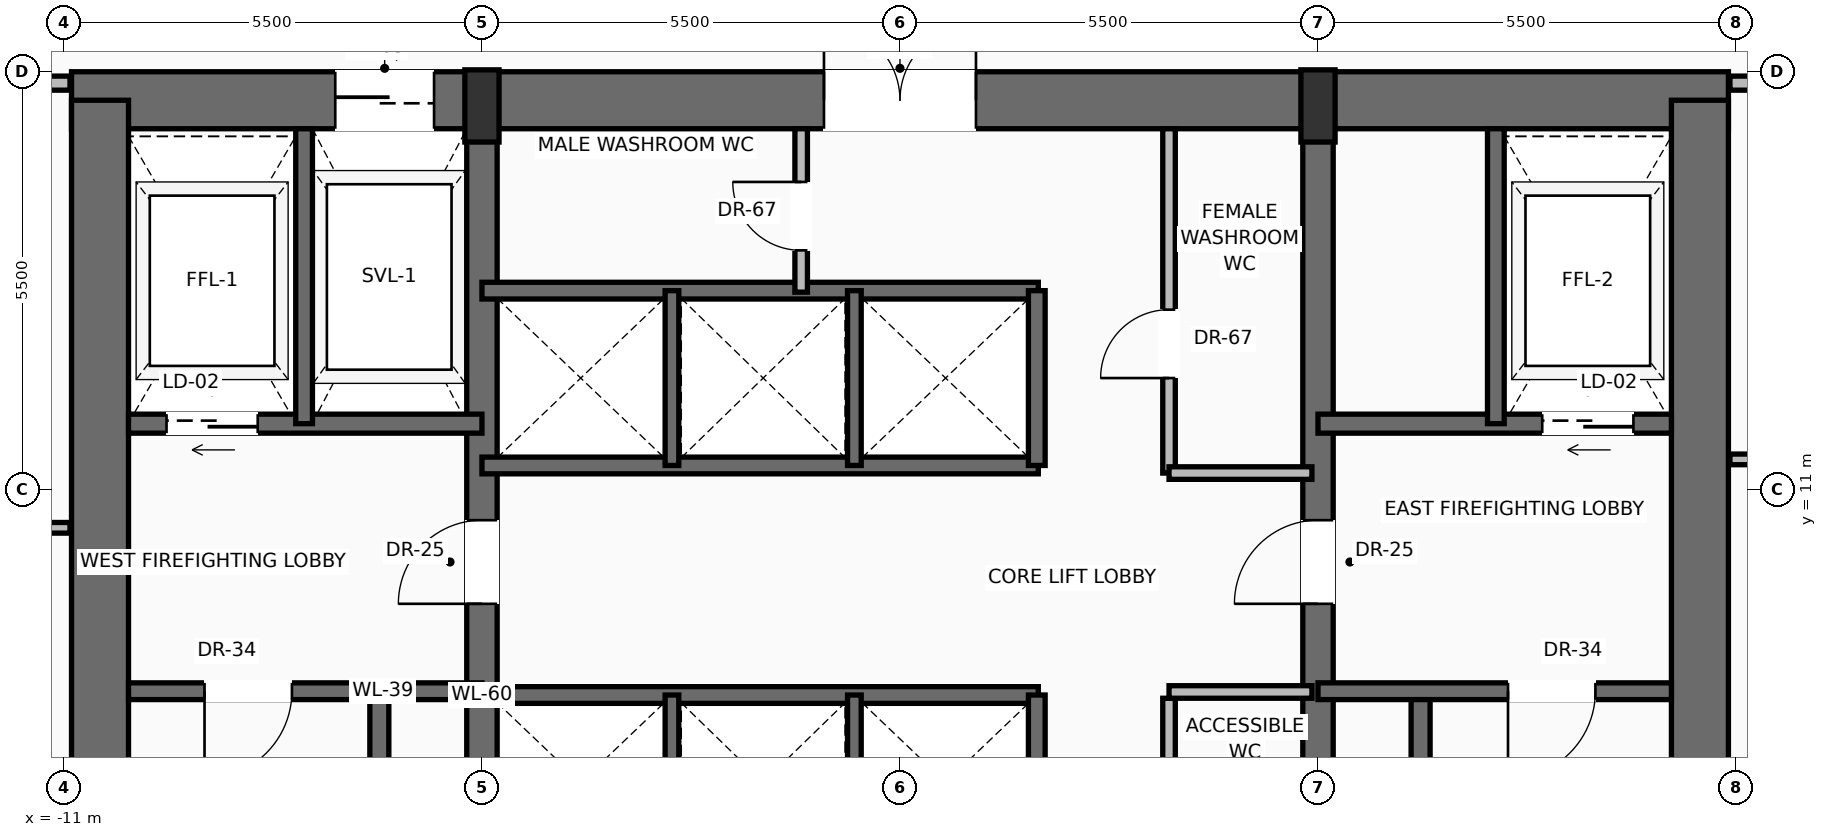
"""IFC4 building model, lengths in metres.
Left out: names, types, materials, properties, quantities, classifications, styles, units other than length and angle.
Written with IfcOpenShell. Run it as: python <this file> out.ifc"""

import sys

from ifc_helpers import new_model, si_unit, direction, frame, frame_2d, origin, origin_2d, place, context, subcontext, project, spatial, rectangle, extrude, source, transform, mapped, element, fill, save


model = new_model("IFC4")
c1 = context("Model", 3, precision=1e-05, world=origin(), true_north=direction((0.0, 1.0)))
c2 = subcontext(c1, "Body", "Model", "MODEL_VIEW")
j1 = project(units=[si_unit("LENGTHUNIT", "METRE"), si_unit("PLANEANGLEUNIT", "RADIAN")], contexts=[c1])
p1 = place(None, origin())
s1 = spatial("IfcSite", under=j1, at=p1, CompositionType="ELEMENT")
p2 = place(p1, origin())
s2 = spatial("IfcBuilding", under=s1, at=p2, CompositionType="ELEMENT")
p3 = place(p2, frame((0.0, 0.0, 95.1)))
s3 = spatial("IfcBuildingStorey", under=s2, at=p3, CompositionType="ELEMENT", Elevation=95.1)
p4 = place(p3, frame((-10.9, 16.125, 0.0), z_axis=(0.0, 0.0, 1.0), x_axis=(1.0, 0.0, 0.0)))
e1 = element("IfcWall", 1, at=p4, inside=s3, PredefinedType="SHEAR", context=c2, shape_type="SweptSolid", body=[
    extrude(rectangle(XDim=21.8, YDim=0.75, at=frame_2d((10.9, 0.0))), origin(), (0.0, 0.0, 1.0), 3.45),
])
p5 = place(p4, frame((3.47, 0.0, 0.0)))
e2 = element("IfcOpeningElement", 2, at=p5, cuts=e1, PredefinedType="OPENING", context=c2, shape_type="SweptSolid", body=[
    extrude(rectangle(XDim=1.3, YDim=2.3, at=frame_2d((0.65, 1.15))), frame((0.0, 0.385, 0.0), z_axis=(0.0, -1.0, 0.0), x_axis=(1.0, 0.0, 0.0)), (0.0, 0.0, 1.0), 0.77),
])
p6 = place(p4, frame((9.9, 0.0, 0.0)))
e3 = element("IfcOpeningElement", 3, at=p6, cuts=e1, PredefinedType="OPENING", context=c2, shape_type="SweptSolid", body=[
    extrude(rectangle(XDim=2.0, YDim=2.4, at=frame_2d((1.0, 1.2))), frame((0.0, 0.385, 0.0), z_axis=(0.0, -1.0, 0.0), x_axis=(1.0, 0.0, 0.0)), (0.0, 0.0, 1.0), 0.77),
])
for number, where, z_axis, x_axis in (
    (4, (-10.525, 0.475, 0.0), (0.0, 0.0, 1.0), (0.0, 1.0, 0.0)),
    (5, (10.525, 0.475, 0.0), (0.0, 0.0, 1.0), (0.0, 1.0, 0.0)),
):
    element("IfcWall", number, at=place(p3, frame(where, z_axis=z_axis, x_axis=x_axis)), inside=s3, PredefinedType="SHEAR", context=c2, shape_type="SweptSolid", body=[
        extrude(rectangle(XDim=15.65, YDim=0.75, at=frame_2d((7.825, 0.0))), origin(), (0.0, 0.0, 1.0), 3.45),
    ])
p7 = place(p3, frame((-5.5, 0.475, 0.0), z_axis=(0.0, 0.0, 1.0), x_axis=(0.0, 1.0, 0.0)))
e6 = element("IfcWall", 6, at=p7, inside=s3, PredefinedType="SHEAR", context=c2, shape_type="SweptSolid", body=[
    extrude(rectangle(XDim=15.65, YDim=0.4, at=frame_2d((7.825, 0.0))), origin(), (0.0, 0.0, 1.0), 3.45),
])
p8 = place(p7, frame((9.025, 0.0, 0.0)))
e7 = element("IfcOpeningElement", 7, at=p8, cuts=e6, PredefinedType="OPENING", context=c2, shape_type="SweptSolid", body=[
    extrude(rectangle(XDim=1.1, YDim=2.2, at=frame_2d((0.55, 1.1))), frame((0.0, 0.21, 0.0), z_axis=(0.0, -1.0, 0.0), x_axis=(1.0, 0.0, 0.0)), (0.0, 0.0, 1.0), 0.42),
])
p9 = place(p3, frame((5.5, 0.475, 0.0), z_axis=(0.0, 0.0, 1.0), x_axis=(0.0, 1.0, 0.0)))
e8 = element("IfcWall", 8, at=p9, inside=s3, PredefinedType="SHEAR", context=c2, shape_type="SweptSolid", body=[
    extrude(rectangle(XDim=15.65, YDim=0.4, at=frame_2d((7.825, 0.0))), origin(), (0.0, 0.0, 1.0), 3.45),
])
p10 = place(p9, frame((9.025, 0.0, 0.0)))
e9 = element("IfcOpeningElement", 9, at=p10, cuts=e8, PredefinedType="OPENING", context=c2, shape_type="SweptSolid", body=[
    extrude(rectangle(XDim=1.1, YDim=2.2, at=frame_2d((0.55, 1.1))), frame((0.0, 0.21, 0.0), z_axis=(0.0, -1.0, 0.0), x_axis=(1.0, 0.0, 0.0)), (0.0, 0.0, 1.0), 0.42),
])
m1 = source(origin(), c2, "Body", "SweptSolid", [
    extrude(rectangle(XDim=0.45, YDim=0.95, at=origin_2d()), origin(), (0.0, 0.0, 1.0), 3.7),
])
for number, where, z_axis, x_axis in (
    (10, (-5.5, 16.05, 0.0), (0.0, 0.0, 1.0), (1.0, 0.0, 0.0)),
    (11, (5.5, 16.05, 0.0), (0.0, 0.0, 1.0), (1.0, 0.0, 0.0)),
):
    element("IfcColumn", number, at=place(p3, frame(where, z_axis=z_axis, x_axis=x_axis)), inside=s3, PredefinedType="PILASTER", context=c2, shape_type="MappedRepresentation", body=[
        mapped(m1, transform((0.0, 0.0, 0.0), scale=1.0)),
    ])
p11 = place(p3, frame((-6.85, 0.85, 0.0), z_axis=(0.0, 0.0, 1.0), x_axis=(0.0, 1.0, 0.0)))
e12 = element("IfcWall", 12, at=p11, inside=s3, PredefinedType="SOLIDWALL", context=c2, shape_type="SweptSolid", body=[
    extrude(rectangle(XDim=7.5, YDim=0.25, at=frame_2d((3.75, 0.0))), origin(), (0.0, 0.0, 1.0), 3.45),
])
p12 = place(p3, frame((-5.5, 8.35, 0.0), z_axis=(0.0, 0.0, 1.0), x_axis=(-1.0, 0.0, 0.0)))
e13 = element("IfcWall", 13, at=p12, inside=s3, PredefinedType="SOLIDWALL", context=c2, shape_type="SweptSolid", body=[
    extrude(rectangle(XDim=4.65, YDim=0.22, at=frame_2d((2.325, 0.0))), origin(), (0.0, 0.0, 1.0), 3.45),
])
p13 = place(p12, frame((2.5, 0.0, 0.0)))
e14 = element("IfcOpeningElement", 14, at=p13, cuts=e13, PredefinedType="OPENING", context=c2, shape_type="SweptSolid", body=[
    extrude(rectangle(XDim=1.15, YDim=2.2, at=frame_2d((0.575, 1.1))), frame((0.0, 0.12, 0.0), z_axis=(0.0, -1.0, 0.0), x_axis=(1.0, 0.0, 0.0)), (0.0, 0.0, 1.0), 0.24),
])
p14 = place(p3, frame((-5.5, 11.87, 0.0), z_axis=(0.0, 0.0, 1.0), x_axis=(-1.0, 0.0, 0.0)))
e15 = element("IfcWall", 15, at=p14, inside=s3, PredefinedType="SOLIDWALL", context=c2, shape_type="SweptSolid", body=[
    extrude(rectangle(XDim=4.65, YDim=0.25, at=frame_2d((2.325, 0.0))), origin(), (0.0, 0.0, 1.0), 3.45),
])
p15 = place(p14, frame((2.95, 0.0, 0.0)))
e16 = element("IfcOpeningElement", 16, at=p15, cuts=e15, PredefinedType="OPENING", context=c2, shape_type="SweptSolid", body=[
    extrude(rectangle(XDim=1.2, YDim=2.25, at=frame_2d((0.6, 1.125))), frame((0.0, 0.135, 0.0), z_axis=(0.0, -1.0, 0.0), x_axis=(1.0, 0.0, 0.0)), (0.0, 0.0, 1.0), 0.27),
])
p16 = place(p3, frame((-7.84, 11.87, 0.0), z_axis=(0.0, 0.0, 1.0), x_axis=(0.0, 1.0, 0.0)))
e17 = element("IfcWall", 17, at=p16, inside=s3, PredefinedType="SOLIDWALL", context=c2, shape_type="SweptSolid", body=[
    extrude(rectangle(XDim=3.88, YDim=0.22, at=frame_2d((1.94, 0.0))), origin(), (0.0, 0.0, 1.0), 3.45),
])
p17 = place(p3, frame((6.85, 0.85, 0.0), z_axis=(0.0, 0.0, 1.0), x_axis=(0.0, 1.0, 0.0)))
e18 = element("IfcWall", 18, at=p17, inside=s3, PredefinedType="SOLIDWALL", context=c2, shape_type="SweptSolid", body=[
    extrude(rectangle(XDim=7.5, YDim=0.25, at=frame_2d((3.75, 0.0))), origin(), (0.0, 0.0, 1.0), 3.45),
])
p18 = place(p3, frame((10.15, 8.35, 0.0), z_axis=(0.0, 0.0, 1.0), x_axis=(-1.0, 0.0, 0.0)))
e19 = element("IfcWall", 19, at=p18, inside=s3, PredefinedType="SOLIDWALL", context=c2, shape_type="SweptSolid", body=[
    extrude(rectangle(XDim=4.65, YDim=0.22, at=frame_2d((2.325, 0.0))), origin(), (0.0, 0.0, 1.0), 3.45),
])
p19 = place(p18, frame((1.0, 0.0, 0.0)))
e20 = element("IfcOpeningElement", 20, at=p19, cuts=e19, PredefinedType="OPENING", context=c2, shape_type="SweptSolid", body=[
    extrude(rectangle(XDim=1.15, YDim=2.2, at=frame_2d((0.575, 1.1))), frame((0.0, 0.12, 0.0), z_axis=(0.0, -1.0, 0.0), x_axis=(1.0, 0.0, 0.0)), (0.0, 0.0, 1.0), 0.24),
])
p20 = place(p3, frame((10.15, 11.87, 0.0), z_axis=(0.0, 0.0, 1.0), x_axis=(-1.0, 0.0, 0.0)))
e21 = element("IfcWall", 21, at=p20, inside=s3, PredefinedType="SOLIDWALL", context=c2, shape_type="SweptSolid", body=[
    extrude(rectangle(XDim=4.65, YDim=0.25, at=frame_2d((2.325, 0.0))), origin(), (0.0, 0.0, 1.0), 3.45),
])
p21 = place(p20, frame((0.5, 0.0, 0.0)))
e22 = element("IfcOpeningElement", 22, at=p21, cuts=e21, PredefinedType="OPENING", context=c2, shape_type="SweptSolid", body=[
    extrude(rectangle(XDim=1.2, YDim=2.25, at=frame_2d((0.6, 1.125))), frame((0.0, 0.135, 0.0), z_axis=(0.0, -1.0, 0.0), x_axis=(1.0, 0.0, 0.0)), (0.0, 0.0, 1.0), 0.27),
])
p22 = place(p3, frame((7.84, 11.87, 0.0), z_axis=(0.0, 0.0, 1.0), x_axis=(0.0, 1.0, 0.0)))
e23 = element("IfcWall", 23, at=p22, inside=s3, PredefinedType="SOLIDWALL", context=c2, shape_type="SweptSolid", body=[
    extrude(rectangle(XDim=3.88, YDim=0.22, at=frame_2d((1.94, 0.0))), origin(), (0.0, 0.0, 1.0), 3.45),
])
p23 = place(p3, frame((3.54, 4.433, 0.0), z_axis=(0.0, 0.0, 1.0), x_axis=(0.0, 1.0, 0.0)))
e24 = element("IfcWall", 24, at=p23, inside=s3, PredefinedType="PARTITIONING", context=c2, shape_type="SweptSolid", body=[
    extrude(rectangle(XDim=3.825, YDim=0.165, at=frame_2d((1.913, 0.0))), origin(), (0.0, 0.0, 1.0), 3.442),
])
p24 = place(p23, frame((1.721, 0.0, 0.0)))
e25 = element("IfcOpeningElement", 25, at=p24, cuts=e24, PredefinedType="OPENING", context=c2, shape_type="SweptSolid", body=[
    extrude(rectangle(XDim=0.9, YDim=2.1, at=frame_2d((0.45, 1.05))), frame((0.0, 0.093, 0.0), z_axis=(0.0, -1.0, 0.0), x_axis=(1.0, 0.0, 0.0)), (0.0, 0.0, 1.0), 0.185),
])
p25 = place(p3, frame((3.54, 8.34, 0.0), z_axis=(0.0, 0.0, 1.0), x_axis=(1.0, 0.0, 0.0)))
e26 = element("IfcWall", 26, at=p25, inside=s3, PredefinedType="PARTITIONING", context=c2, shape_type="SweptSolid", body=[
    extrude(rectangle(XDim=1.88, YDim=0.165, at=frame_2d((0.94, 0.0))), origin(), (0.0, 0.0, 1.0), 3.442),
])
p26 = place(p3, frame((-5.5, 8.3, 0.0), z_axis=(0.0, 0.0, 1.0), x_axis=(1.0, 0.0, 0.0)))
e27 = element("IfcWall", 27, at=p26, inside=s3, PredefinedType="SOLIDWALL", context=c2, shape_type="SweptSolid", body=[
    extrude(rectangle(XDim=7.32, YDim=0.22, at=frame_2d((3.66, 0.0))), origin(), (0.0, 0.0, 1.0), 3.45),
])
p27 = place(p3, frame((1.8, 6.0, 0.0), z_axis=(0.0, 0.0, 1.0), x_axis=(0.0, 1.0, 0.0)))
e28 = element("IfcWall", 28, at=p27, inside=s3, PredefinedType="SOLIDWALL", context=c2, shape_type="SweptSolid", body=[
    extrude(rectangle(XDim=2.3, YDim=0.22, at=frame_2d((1.15, 0.0))), origin(), (0.0, 0.0, 1.0), 3.45),
])
for number, where, z_axis, x_axis in (
    (29, (-3.0, 6.0, 0.0), (0.0, 0.0, 1.0), (0.0, 1.0, 0.0)),
    (30, (-0.6, 6.0, 0.0), (0.0, 0.0, 1.0), (0.0, 1.0, 0.0)),
):
    element("IfcWall", number, at=place(p3, frame(where, z_axis=z_axis, x_axis=x_axis)), inside=s3, PredefinedType="SOLIDWALL", context=c2, shape_type="SweptSolid", body=[
        extrude(rectangle(XDim=2.3, YDim=0.18, at=frame_2d((1.15, 0.0))), origin(), (0.0, 0.0, 1.0), 3.45),
    ])
for number, where, z_axis, x_axis in (
    (31, (-5.5, 11.32, 0.0), (0.0, 0.0, 1.0), (1.0, 0.0, 0.0)),
    (32, (-5.5, 13.62, 0.0), (0.0, 0.0, 1.0), (1.0, 0.0, 0.0)),
):
    element("IfcWall", number, at=place(p3, frame(where, z_axis=z_axis, x_axis=x_axis)), inside=s3, PredefinedType="SOLIDWALL", context=c2, shape_type="SweptSolid", body=[
        extrude(rectangle(XDim=7.32, YDim=0.22, at=frame_2d((3.66, 0.0))), origin(), (0.0, 0.0, 1.0), 3.45),
    ])
p28 = place(p3, frame((1.8, 11.32, 0.0), z_axis=(0.0, 0.0, 1.0), x_axis=(0.0, 1.0, 0.0)))
e33 = element("IfcWall", 33, at=p28, inside=s3, PredefinedType="SOLIDWALL", context=c2, shape_type="SweptSolid", body=[
    extrude(rectangle(XDim=2.3, YDim=0.22, at=frame_2d((1.15, 0.0))), origin(), (0.0, 0.0, 1.0), 3.45),
])
for number, where, z_axis, x_axis in (
    (34, (-3.0, 11.32, 0.0), (0.0, 0.0, 1.0), (0.0, 1.0, 0.0)),
    (35, (-0.6, 11.32, 0.0), (0.0, 0.0, 1.0), (0.0, 1.0, 0.0)),
):
    element("IfcWall", number, at=place(p3, frame(where, z_axis=z_axis, x_axis=x_axis)), inside=s3, PredefinedType="SOLIDWALL", context=c2, shape_type="SweptSolid", body=[
        extrude(rectangle(XDim=2.3, YDim=0.18, at=frame_2d((1.15, 0.0))), origin(), (0.0, 0.0, 1.0), 3.45),
    ])
p29 = place(p3, frame((-1.3, 13.6, 0.0), z_axis=(0.0, 0.0, 1.0), x_axis=(0.0, 1.0, 0.0)))
e36 = element("IfcWall", 36, at=p29, inside=s3, PredefinedType="PARTITIONING", context=c2, shape_type="SweptSolid", body=[
    extrude(rectangle(XDim=2.15, YDim=0.165, at=frame_2d((1.075, 0.0))), origin(), (0.0, 0.0, 1.0), 3.442),
])
p30 = place(p29, frame((0.55, 0.0, 0.0)))
e37 = element("IfcOpeningElement", 37, at=p30, cuts=e36, PredefinedType="OPENING", context=c2, shape_type="SweptSolid", body=[
    extrude(rectangle(XDim=0.9, YDim=2.1, at=frame_2d((0.45, 1.05))), frame((0.0, 0.093, 0.0), z_axis=(0.0, -1.0, 0.0), x_axis=(1.0, 0.0, 0.0)), (0.0, 0.0, 1.0), 0.185),
])
p31 = place(p3, frame((3.54, 11.22, 0.0), z_axis=(0.0, 0.0, 1.0), x_axis=(0.0, 1.0, 0.0)))
e38 = element("IfcWall", 38, at=p31, inside=s3, PredefinedType="PARTITIONING", context=c2, shape_type="SweptSolid", body=[
    extrude(rectangle(XDim=4.53, YDim=0.165, at=frame_2d((2.265, 0.0))), origin(), (0.0, 0.0, 1.0), 3.442),
])
p32 = place(p31, frame((1.25, 0.0, 0.0)))
e39 = element("IfcOpeningElement", 39, at=p32, cuts=e38, PredefinedType="OPENING", context=c2, shape_type="SweptSolid", body=[
    extrude(rectangle(XDim=0.9, YDim=2.1, at=frame_2d((0.45, 1.05))), frame((0.0, 0.093, 0.0), z_axis=(0.0, -1.0, 0.0), x_axis=(1.0, 0.0, 0.0)), (0.0, 0.0, 1.0), 0.185),
])
p33 = place(p3, frame((3.54, 11.22, 0.0), z_axis=(0.0, 0.0, 1.0), x_axis=(1.0, 0.0, 0.0)))
e40 = element("IfcWall", 40, at=p33, inside=s3, PredefinedType="PARTITIONING", context=c2, shape_type="SweptSolid", body=[
    extrude(rectangle(XDim=1.88, YDim=0.165, at=frame_2d((0.94, 0.0))), origin(), (0.0, 0.0, 1.0), 3.442),
])
p34 = place(p3, frame((-22.993, 16.35, 0.0), z_axis=(0.0, 0.0, 1.0), x_axis=(1.0, 0.0, 0.0)))
e41 = element("IfcWall", 41, at=p34, inside=s3, PredefinedType="PARTITIONING", context=c2, shape_type="SweptSolid", body=[
    extrude(rectangle(XDim=12.073, YDim=0.185, at=frame_2d((6.036, 0.0))), origin(), (0.0, 0.0, 1.0), 2.747),
])
p35 = place(p34, frame((4.992, 0.0, 0.0)))
e42 = element("IfcOpeningElement", 42, at=p35, cuts=e41, PredefinedType="OPENING", context=c2, shape_type="SweptSolid", body=[
    extrude(rectangle(XDim=0.95, YDim=2.2, at=frame_2d((0.475, 1.1))), frame((0.0, 0.103, 0.0), z_axis=(0.0, -1.0, 0.0), x_axis=(1.0, 0.0, 0.0)), (0.0, 0.0, 1.0), 0.205),
])
p36 = place(p3, frame((10.92, 16.35, 0.0), z_axis=(0.0, 0.0, 1.0), x_axis=(1.0, 0.0, 0.0)))
e43 = element("IfcWall", 43, at=p36, inside=s3, PredefinedType="PARTITIONING", context=c2, shape_type="SweptSolid", body=[
    extrude(rectangle(XDim=12.485, YDim=0.185, at=frame_2d((6.243, 0.0))), origin(), (0.0, 0.0, 1.0), 2.747),
])
p37 = place(p36, frame((6.358, 0.0, 0.0)))
e44 = element("IfcOpeningElement", 44, at=p37, cuts=e43, PredefinedType="OPENING", context=c2, shape_type="SweptSolid", body=[
    extrude(rectangle(XDim=0.95, YDim=2.2, at=frame_2d((0.475, 1.1))), frame((0.0, 0.103, 0.0), z_axis=(0.0, -1.0, 0.0), x_axis=(1.0, 0.0, 0.0)), (0.0, 0.0, 1.0), 0.205),
])
p38 = place(p3, frame((-26.927, 10.5, 0.0), z_axis=(0.0, 0.0, 1.0), x_axis=(1.0, 0.0, 0.0)))
e45 = element("IfcWall", 45, at=p38, inside=s3, PredefinedType="PARTITIONING", context=c2, shape_type="SweptSolid", body=[
    extrude(rectangle(XDim=16.007, YDim=0.14, at=frame_2d((8.003, 0.0))), origin(), (0.0, 0.0, 1.0), 3.442),
])
p39 = place(p38, frame((7.54, 0.0, 0.0)))
e46 = element("IfcOpeningElement", 46, at=p39, cuts=e45, PredefinedType="OPENING", context=c2, shape_type="SweptSolid", body=[
    extrude(rectangle(XDim=0.95, YDim=2.2, at=frame_2d((0.475, 1.1))), frame((0.0, 0.08, 0.0), z_axis=(0.0, -1.0, 0.0), x_axis=(1.0, 0.0, 0.0)), (0.0, 0.0, 1.0), 0.16),
])
p40 = place(p3, frame((10.92, 11.4, 0.0), z_axis=(0.0, 0.0, 1.0), x_axis=(1.0, 0.0, 0.0)))
e47 = element("IfcWall", 47, at=p40, inside=s3, PredefinedType="PARTITIONING", context=c2, shape_type="SweptSolid", body=[
    extrude(rectangle(XDim=15.689, YDim=0.14, at=frame_2d((7.845, 0.0))), origin(), (0.0, 0.0, 1.0), 3.442),
])
p41 = place(p40, frame((7.361, 0.0, 0.0)))
e48 = element("IfcOpeningElement", 48, at=p41, cuts=e47, PredefinedType="OPENING", context=c2, shape_type="SweptSolid", body=[
    extrude(rectangle(XDim=0.95, YDim=2.2, at=frame_2d((0.475, 1.1))), frame((0.0, 0.08, 0.0), z_axis=(0.0, -1.0, 0.0), x_axis=(1.0, 0.0, 0.0)), (0.0, 0.0, 1.0), 0.16),
])
m2 = source(origin(), c2, "Body", "SweptSolid", [
    extrude(rectangle(XDim=1.15, YDim=2.2, at=frame_2d((0.575, 1.1))), frame((0.0, 0.025, 0.0), z_axis=(0.0, -1.0, 0.0), x_axis=(1.0, 0.0, 0.0)), (0.0, 0.0, 1.0), 0.05),
])
p42 = place(p13, origin())
e49 = element("IfcDoor", 49, at=p42, inside=s3, OperationType="SINGLE_SWING_RIGHT", PredefinedType="DOOR", context=c2, shape_type="MappedRepresentation", body=[
    mapped(m2, transform((0.0, 0.0, 0.0), scale=1.0)),
])
fill(e14, e49)
m3 = source(origin(), c2, "Body", "SweptSolid", [
    extrude(rectangle(XDim=1.1, YDim=2.2, at=frame_2d((0.55, 1.1))), frame((0.0, 0.025, 0.0), z_axis=(0.0, -1.0, 0.0), x_axis=(1.0, 0.0, 0.0)), (0.0, 0.0, 1.0), 0.05),
])
p43 = place(p8, origin())
e50 = element("IfcDoor", 50, at=p43, inside=s3, OperationType="SINGLE_SWING_LEFT", PredefinedType="DOOR", context=c2, shape_type="MappedRepresentation", body=[
    mapped(m3, transform((0.0, 0.0, 0.0), scale=1.0)),
])
fill(e7, e50)
m4 = source(origin(), c2, "Body", "SweptSolid", [
    extrude(rectangle(XDim=1.2, YDim=2.25, at=frame_2d((0.6, 1.125))), frame((0.0, 0.025, 0.0), z_axis=(0.0, -1.0, 0.0), x_axis=(1.0, 0.0, 0.0)), (0.0, 0.0, 1.0), 0.05),
])
p44 = place(p15, origin())
e51 = element("IfcDoor", 51, at=p44, inside=s3, OperationType="SLIDING_TO_LEFT", PredefinedType="DOOR", context=c2, shape_type="MappedRepresentation", body=[
    mapped(m4, transform((0.0, 0.0, 0.0), scale=1.0)),
])
fill(e16, e51)
m5 = source(origin(), c2, "Body", "SweptSolid", [
    extrude(rectangle(XDim=1.3, YDim=2.3, at=frame_2d((0.65, 1.15))), frame((0.0, 0.025, 0.0), z_axis=(0.0, -1.0, 0.0), x_axis=(1.0, 0.0, 0.0)), (0.0, 0.0, 1.0), 0.05),
])
p45 = place(p5, origin())
e52 = element("IfcDoor", 52, at=p45, inside=s3, OperationType="SLIDING_TO_RIGHT", PredefinedType="DOOR", context=c2, shape_type="MappedRepresentation", body=[
    mapped(m5, transform((0.0, 0.0, 0.0), scale=1.0)),
])
fill(e2, e52)
p46 = place(p19, origin())
e53 = element("IfcDoor", 53, at=p46, inside=s3, OperationType="SINGLE_SWING_RIGHT", PredefinedType="DOOR", context=c2, shape_type="MappedRepresentation", body=[
    mapped(m2, transform((0.0, 0.0, 0.0), scale=1.0)),
])
fill(e20, e53)
p47 = place(p10, origin())
e54 = element("IfcDoor", 54, at=p47, inside=s3, OperationType="SINGLE_SWING_LEFT", PredefinedType="DOOR", context=c2, shape_type="MappedRepresentation", body=[
    mapped(m3, transform((0.0, 0.0, 0.0), scale=1.0)),
])
fill(e9, e54)
p48 = place(p21, origin())
e55 = element("IfcDoor", 55, at=p48, inside=s3, OperationType="SLIDING_TO_RIGHT", PredefinedType="DOOR", context=c2, shape_type="MappedRepresentation", body=[
    mapped(m4, transform((0.0, 0.0, 0.0), scale=1.0)),
])
fill(e22, e55)
m6 = source(origin(), c2, "Body", "SweptSolid", [
    extrude(rectangle(XDim=2.0, YDim=2.4, at=frame_2d((1.0, 1.2))), frame((0.0, 0.025, 0.0), z_axis=(0.0, -1.0, 0.0), x_axis=(1.0, 0.0, 0.0)), (0.0, 0.0, 1.0), 0.05),
])
p49 = place(p6, origin())
e56 = element("IfcDoor", 56, at=p49, inside=s3, OperationType="DOUBLE_DOOR_SINGLE_SWING", PredefinedType="DOOR", context=c2, shape_type="MappedRepresentation", body=[
    mapped(m6, transform((0.0, 0.0, 0.0), scale=1.0)),
])
fill(e3, e56)
m7 = source(origin(), c2, "Body", "SweptSolid", [
    extrude(rectangle(XDim=0.9, YDim=2.1, at=frame_2d((0.45, 1.05))), frame((0.0, 0.025, 0.0), z_axis=(0.0, -1.0, 0.0), x_axis=(1.0, 0.0, 0.0)), (0.0, 0.0, 1.0), 0.05),
])
p50 = place(p30, origin())
e57 = element("IfcDoor", 57, at=p50, inside=s3, OperationType="SINGLE_SWING_RIGHT", PredefinedType="DOOR", context=c2, shape_type="MappedRepresentation", body=[
    mapped(m7, transform((0.0, 0.0, 0.0), scale=1.0)),
])
fill(e37, e57)
p51 = place(p32, origin())
e58 = element("IfcDoor", 58, at=p51, inside=s3, OperationType="SINGLE_SWING_LEFT", PredefinedType="DOOR", context=c2, shape_type="MappedRepresentation", body=[
    mapped(m7, transform((0.0, 0.0, 0.0), scale=1.0)),
])
fill(e39, e58)
save(model, sys.argv[1])
